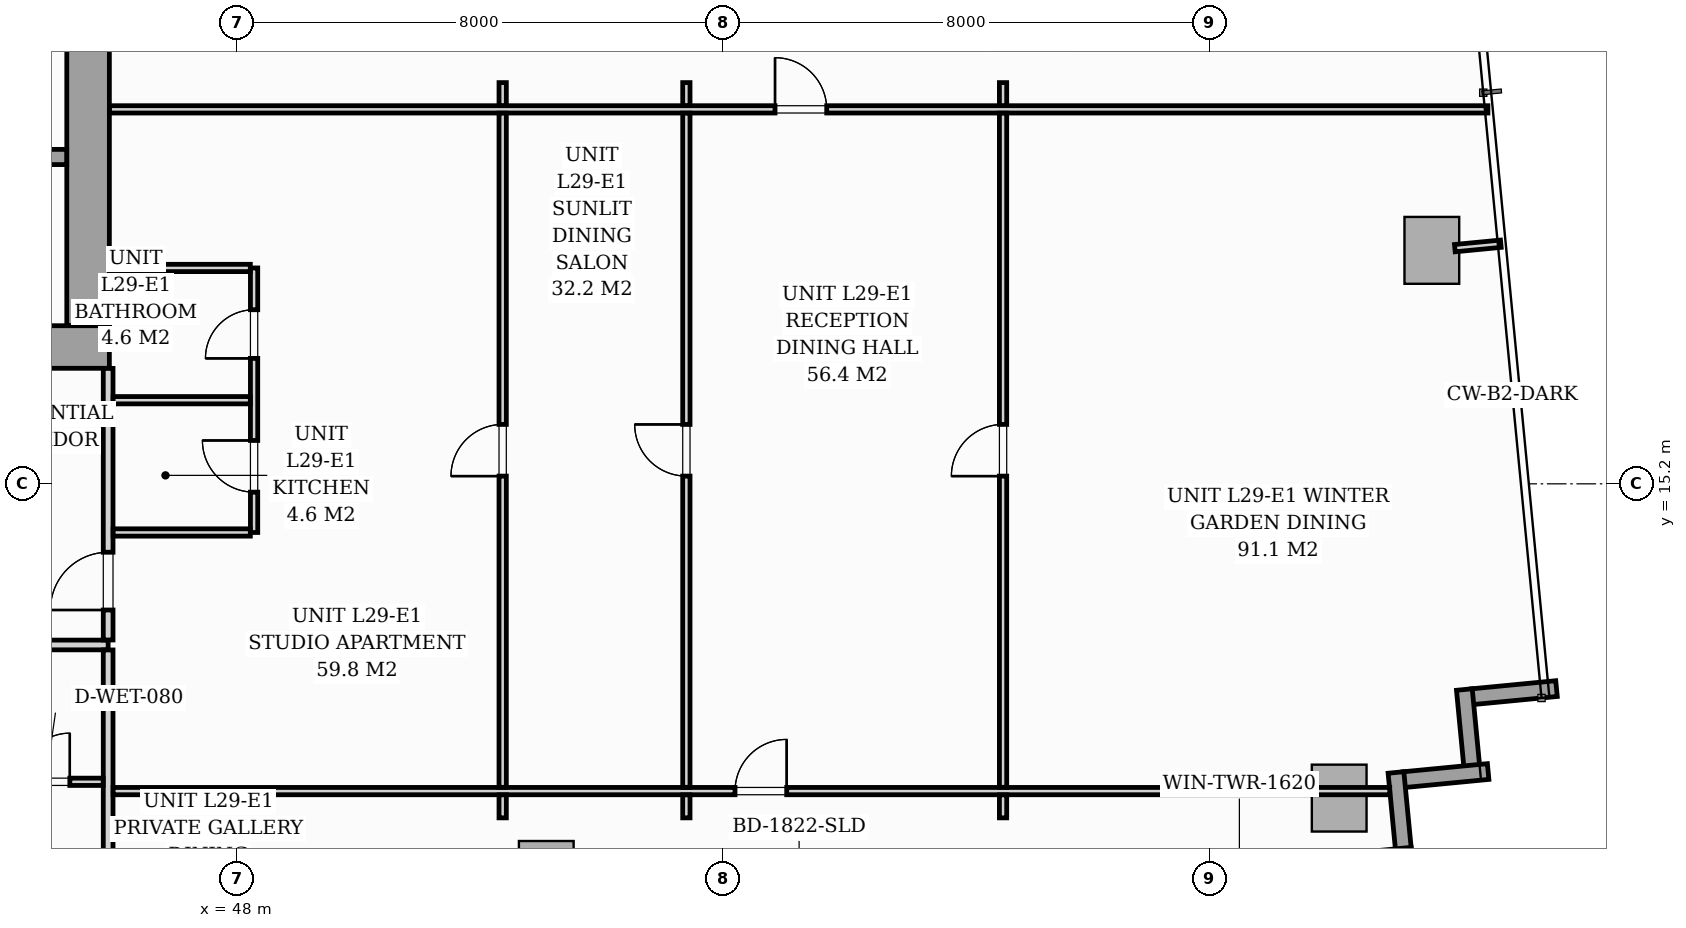
"""IFC4 building model, lengths in metres.
Left out: names, types, materials, properties, quantities, classifications, styles, units other than length and angle.
Written with IfcOpenShell. Run it as: python <this file> out.ifc"""

import sys

from ifc_helpers import new_model, si_unit, direction, frame, frame_2d, origin, origin_2d, place, context, subcontext, project, spatial, rectangle, i_section, extrude, source, transform, mapped, element, fill, save


model = new_model("IFC4")
c1 = context("Model", 3, precision=1e-05, world=origin(), true_north=direction((0.0, 1.0)))
c2 = subcontext(c1, "Body", "Model", "MODEL_VIEW")
j1 = project(units=[si_unit("LENGTHUNIT", "METRE"), si_unit("PLANEANGLEUNIT", "RADIAN")], contexts=[c1])
p1 = place(None, origin())
s1 = spatial("IfcSite", under=j1, at=p1, CompositionType="ELEMENT")
p2 = place(p1, origin())
s2 = spatial("IfcBuilding", under=s1, at=p2, CompositionType="ELEMENT")
p3 = place(p2, frame((0.0, 0.0, 103.4)))
s3 = spatial("IfcBuildingStorey", under=s2, at=p3, CompositionType="ELEMENT", Elevation=103.4)
m1 = source(origin(), c2, "Body", "SweptSolid", [
    extrude(i_section(OverallWidth=0.427, OverallDepth=0.483, WebThickness=0.051, FlangeThickness=0.082, FilletRadius=0.018, at=origin_2d()), origin(), (0.0, 0.0, 1.0), 3.196),
])
p4 = place(p3, frame((45.6, 17.4, 0.002), z_axis=(0.0, 0.0, 1.0), x_axis=(1.0, 0.0, 0.0)))
e1 = element("IfcColumn", 1, at=p4, inside=s3, PredefinedType="PILASTER", context=c2, shape_type="MappedRepresentation", body=[
    mapped(m1, transform((0.0, 0.0, 0.0), scale=1.0)),
])
m2 = source(origin(), c2, "Body", "SweptSolid", [
    extrude(rectangle(XDim=0.9, YDim=1.1, at=origin_2d()), origin(), (0.0, 0.0, 1.0), 3.196),
])
for number, where, z_axis, x_axis in (
    (2, (53.085, 8.776, 0.002), (0.0, 0.0, 1.0), (0.995, 0.096, 0.0)),
    (3, (66.125, 10.032, 0.002), (0.0, 0.0, 1.0), (0.995, 0.096, 0.0)),
    (4, (67.648, 19.039, 0.002), (0.0, 0.0, 1.0), (0.995, 0.096, 0.0)),
):
    element("IfcColumn", number, at=place(p3, frame(where, z_axis=z_axis, x_axis=x_axis)), inside=s3, PredefinedType="COLUMN", context=c2, shape_type="MappedRepresentation", body=[
        mapped(m2, transform((0.0, 0.0, 0.0), scale=1.0)),
    ])
for number, where, z_axis, x_axis in (
    (5, (69.698, 11.833, 0.0), (0.0, 0.0, 1.0), (-0.995, -0.096, 0.0)),
    (6, (68.183, 11.817, 0.0), (0.0, 0.0, 1.0), (0.096, -0.995, 0.0)),
):
    element("IfcWall", number, at=place(p3, frame(where, z_axis=z_axis, x_axis=x_axis)), inside=s3, PredefinedType="STANDARD", context=c2, shape_type="SweptSolid", body=[
        extrude(rectangle(XDim=1.395, YDim=0.26, at=frame_2d((0.697, 0.0))), origin(), (0.0, 0.0, 1.0), 2.94),
    ])
p5 = place(p3, frame((68.574, 10.469, 0.0), z_axis=(0.0, 0.0, 1.0), x_axis=(-0.99540774648, -0.095725744959, 0.0)))
e7 = element("IfcWall", 7, at=p5, inside=s3, PredefinedType="STANDARD", context=c2, shape_type="SweptSolid", body=[
    extrude(rectangle(XDim=1.395, YDim=0.26, at=frame_2d((0.698, 0.0))), origin(), (0.0, 0.0, 1.0), 2.94),
])
p6 = place(p3, frame((67.059, 10.453, 0.0), z_axis=(0.0, 0.0, 1.0), x_axis=(0.095915846097, -0.995389446633, 0.0)))
e8 = element("IfcWall", 8, at=p6, inside=s3, PredefinedType="STANDARD", context=c2, shape_type="SweptSolid", body=[
    extrude(rectangle(XDim=1.395, YDim=0.26, at=frame_2d((0.697, 0.0))), origin(), (0.0, 0.0, 1.0), 2.94),
])
p7 = place(p3, frame((67.32, 9.092, 0.0), z_axis=(0.0, 0.0, 1.0), x_axis=(-0.995396521236, -0.095842399342, 0.0)))
e9 = element("IfcWall", 9, at=p7, inside=s3, PredefinedType="STANDARD", context=c2, shape_type="SweptSolid", body=[
    extrude(rectangle(XDim=19.11, YDim=0.26, at=frame_2d((9.555, 0.0))), origin(), (0.0, 0.0, 1.0), 2.94),
])
p8 = place(p7, frame((9.224, 0.0, 0.0)))
e10 = element("IfcOpeningElement", 10, at=p8, cuts=e9, PredefinedType="OPENING", context=c2, shape_type="SweptSolid", body=[
    extrude(rectangle(XDim=1.8, YDim=2.06, at=frame_2d((0.9, 1.03))), frame((0.0, 0.14, 0.0), z_axis=(0.0, -1.0, 0.0), x_axis=(1.0, 0.0, 0.0)), (0.0, 0.0, 1.0), 0.28),
])
p9 = place(p7, frame((2.05, 0.0, 0.65)))
e11 = element("IfcOpeningElement", 11, at=p9, cuts=e9, PredefinedType="OPENING", context=c2, shape_type="SweptSolid", body=[
    extrude(rectangle(XDim=1.6, YDim=1.5, at=frame_2d((0.8, 0.75))), frame((0.0, 0.14, 0.0), z_axis=(0.0, -1.0, 0.0), x_axis=(1.0, 0.0, 0.0)), (0.0, 0.0, 1.0), 0.28),
])
p10 = place(p3, frame((26.1, 17.45, 0.0), z_axis=(0.0, 0.0, 1.0), x_axis=(1.0, 0.0, 0.0)))
e12 = element("IfcWall", 12, at=p10, inside=s3, PredefinedType="SHEAR", context=c2, shape_type="SweptSolid", body=[
    extrude(rectangle(XDim=19.8, YDim=0.7, at=frame_2d((9.9, 0.0))), origin(), (0.0, 0.0, 1.0), 3.2),
])
p11 = place(p10, frame((1.05, 0.0, 0.0)))
e13 = element("IfcOpeningElement", 13, at=p11, cuts=e12, PredefinedType="OPENING", context=c2, shape_type="SweptSolid", body=[
    extrude(rectangle(XDim=0.95, YDim=2.06, at=frame_2d((0.475, 1.03))), frame((0.0, 0.36, 0.0), z_axis=(0.0, -1.0, 0.0), x_axis=(1.0, 0.0, 0.0)), (0.0, 0.0, 1.0), 0.72),
])
p12 = place(p10, frame((9.48, 0.0, 0.0)))
e14 = element("IfcOpeningElement", 14, at=p12, cuts=e12, PredefinedType="OPENING", context=c2, shape_type="SweptSolid", body=[
    extrude(rectangle(XDim=0.85, YDim=2.0, at=frame_2d((0.425, 1.0))), frame((0.0, 0.36, 0.0), z_axis=(0.0, -1.0, 0.0), x_axis=(1.0, 0.0, 0.0)), (0.0, 0.0, 1.0), 0.72),
])
p13 = place(p10, frame((17.65, 0.0, 0.0)))
e15 = element("IfcOpeningElement", 15, at=p13, cuts=e12, PredefinedType="OPENING", context=c2, shape_type="SweptSolid", body=[
    extrude(rectangle(XDim=0.95, YDim=2.06, at=frame_2d((0.475, 1.03))), frame((0.0, 0.36, 0.0), z_axis=(0.0, -1.0, 0.0), x_axis=(1.0, 0.0, 0.0)), (0.0, 0.0, 1.0), 0.72),
])
p14 = place(p3, frame((45.55, 17.802, 0.0), z_axis=(0.0, 0.0, 1.0), x_axis=(0.0, 1.0, 0.0)))
e16 = element("IfcWall", 16, at=p14, inside=s3, PredefinedType="SHEAR", context=c2, shape_type="SweptSolid", body=[
    extrude(rectangle(XDim=5.796, YDim=0.7, at=frame_2d((2.898, 0.0))), origin(), (0.0, 0.0, 1.0), 3.2),
])
p15 = place(p3, frame((37.05, 20.575, 0.0), z_axis=(0.0, 0.0, 1.0), x_axis=(1.0, 0.0, 0.0)))
e17 = element("IfcWall", 17, at=p15, inside=s3, PredefinedType="SOLIDWALL", context=c2, shape_type="SweptSolid", body=[
    extrude(rectangle(XDim=8.148, YDim=0.25, at=frame_2d((4.074, 0.0))), origin(), (0.0, 0.0, 1.0), 3.2),
])
p16 = place(p15, frame((6.6, 0.0, 0.0)))
e18 = element("IfcOpeningElement", 18, at=p16, cuts=e17, PredefinedType="OPENING", context=c2, shape_type="SweptSolid", body=[
    extrude(rectangle(XDim=0.95, YDim=2.06, at=frame_2d((0.475, 1.03))), frame((0.0, 0.135, 0.0), z_axis=(0.0, -1.0, 0.0), x_axis=(1.0, 0.0, 0.0)), (0.0, 0.0, 1.0), 0.27),
])
p17 = place(p3, frame((21.5, 12.55, 0.0), z_axis=(0.0, 0.0, 1.0), x_axis=(1.0, 0.0, 0.0)))
e19 = element("IfcWall", 19, at=p17, inside=s3, PredefinedType="PARTITIONING", context=c2, shape_type="SweptSolid", body=[
    extrude(rectangle(XDim=24.38, YDim=0.16, at=frame_2d((12.19, 0.0))), origin(), (0.0, 0.0, 1.0), 2.94),
])
p18 = place(p17, frame((6.075, 0.0, 0.0)))
e20 = element("IfcOpeningElement", 20, at=p18, cuts=e19, PredefinedType="OPENING", context=c2, shape_type="SweptSolid", body=[
    extrude(rectangle(XDim=0.95, YDim=2.06, at=frame_2d((0.475, 1.03))), frame((0.0, 0.09, 0.0), z_axis=(0.0, -1.0, 0.0), x_axis=(1.0, 0.0, 0.0)), (0.0, 0.0, 1.0), 0.18),
])
p19 = place(p17, frame((10.519, 0.0, 0.0)))
e21 = element("IfcOpeningElement", 21, at=p19, cuts=e19, PredefinedType="OPENING", context=c2, shape_type="SweptSolid", body=[
    extrude(rectangle(XDim=0.95, YDim=2.06, at=frame_2d((0.475, 1.03))), frame((0.0, 0.09, 0.0), z_axis=(0.0, -1.0, 0.0), x_axis=(1.0, 0.0, 0.0)), (0.0, 0.0, 1.0), 0.18),
])
p20 = place(p17, frame((18.208, 0.0, 0.0)))
e22 = element("IfcOpeningElement", 22, at=p20, cuts=e19, PredefinedType="OPENING", context=c2, shape_type="SweptSolid", body=[
    extrude(rectangle(XDim=0.95, YDim=2.06, at=frame_2d((0.475, 1.03))), frame((0.0, 0.09, 0.0), z_axis=(0.0, -1.0, 0.0), x_axis=(1.0, 0.0, 0.0)), (0.0, 0.0, 1.0), 0.18),
])
p21 = place(p3, frame((45.88, 6.977, 0.0), z_axis=(0.0, 0.0, 1.0), x_axis=(0.0, 1.0, 0.0)))
e23 = element("IfcWall", 23, at=p21, inside=s3, PredefinedType="PARTITIONING", context=c2, shape_type="SweptSolid", body=[
    extrude(rectangle(XDim=5.491, YDim=0.16, at=frame_2d((2.745, 0.0))), origin(), (0.0, 0.0, 1.0), 2.94),
])
p22 = place(p3, frame((45.88, 12.632, 0.0), z_axis=(0.0, 0.0, 1.0), x_axis=(0.0, 1.0, 0.0)))
e24 = element("IfcWall", 24, at=p22, inside=s3, PredefinedType="PARTITIONING", context=c2, shape_type="SweptSolid", body=[
    extrude(rectangle(XDim=4.466, YDim=0.16, at=frame_2d((2.233, 0.0))), origin(), (0.0, 0.0, 1.0), 2.94),
])
p23 = place(p22, frame((0.493, 0.0, 0.0)))
e25 = element("IfcOpeningElement", 25, at=p23, cuts=e24, PredefinedType="OPENING", context=c2, shape_type="SweptSolid", body=[
    extrude(rectangle(XDim=0.95, YDim=2.06, at=frame_2d((0.475, 1.03))), frame((0.0, 0.09, 0.0), z_axis=(0.0, -1.0, 0.0), x_axis=(1.0, 0.0, 0.0)), (0.0, 0.0, 1.0), 0.18),
])
p24 = place(p3, frame((41.7, 10.3, 0.0), z_axis=(0.0, 0.0, 1.0), x_axis=(1.0, 0.0, 0.0)))
e26 = element("IfcWall", 26, at=p24, inside=s3, PredefinedType="PARTITIONING", context=c2, shape_type="SweptSolid", body=[
    extrude(rectangle(XDim=4.098, YDim=0.12, at=frame_2d((2.049, 0.0))), origin(), (0.0, 0.0, 1.0), 2.94),
])
p25 = place(p24, frame((0.675, 0.0, 0.0)))
e27 = element("IfcOpeningElement", 27, at=p25, cuts=e26, PredefinedType="OPENING", context=c2, shape_type="SweptSolid", body=[
    extrude(rectangle(XDim=0.85, YDim=2.05, at=frame_2d((0.425, 1.025))), frame((0.0, 0.07, 0.0), z_axis=(0.0, -1.0, 0.0), x_axis=(1.0, 0.0, 0.0)), (0.0, 0.0, 1.0), 0.14),
])
p26 = place(p24, frame((2.75, 0.0, 0.0)))
e28 = element("IfcOpeningElement", 28, at=p26, cuts=e26, PredefinedType="OPENING", context=c2, shape_type="SweptSolid", body=[
    extrude(rectangle(XDim=0.8, YDim=2.02, at=frame_2d((0.4, 1.01))), frame((0.0, 0.07, 0.0), z_axis=(0.0, -1.0, 0.0), x_axis=(1.0, 0.0, 0.0)), (0.0, 0.0, 1.0), 0.14),
])
p27 = place(p3, frame((48.28, 14.4, 0.0), z_axis=(0.0, 0.0, 1.0), x_axis=(0.0, 1.0, 0.0)))
e29 = element("IfcWall", 29, at=p27, inside=s3, PredefinedType="PARTITIONING", context=c2, shape_type="SweptSolid", body=[
    extrude(rectangle(XDim=4.35, YDim=0.12, at=frame_2d((2.175, 0.0))), origin(), (0.0, 0.0, 1.0), 2.94),
])
p28 = place(p27, frame((0.663, 0.0, 0.0)))
e30 = element("IfcOpeningElement", 30, at=p28, cuts=e29, PredefinedType="OPENING", context=c2, shape_type="SweptSolid", body=[
    extrude(rectangle(XDim=0.85, YDim=2.05, at=frame_2d((0.425, 1.025))), frame((0.0, 0.07, 0.0), z_axis=(0.0, -1.0, 0.0), x_axis=(1.0, 0.0, 0.0)), (0.0, 0.0, 1.0), 0.14),
])
p29 = place(p27, frame((2.863, 0.0, 0.0)))
e31 = element("IfcOpeningElement", 31, at=p29, cuts=e29, PredefinedType="OPENING", context=c2, shape_type="SweptSolid", body=[
    extrude(rectangle(XDim=0.8, YDim=2.02, at=frame_2d((0.4, 1.01))), frame((0.0, 0.07, 0.0), z_axis=(0.0, -1.0, 0.0), x_axis=(1.0, 0.0, 0.0)), (0.0, 0.0, 1.0), 0.14),
])
for number, where, z_axis, x_axis in (
    (32, (45.962, 16.575, 0.0), (0.0, 0.0, 1.0), (1.0, 0.0, 0.0)),
    (33, (45.962, 14.4, 0.0), (0.0, 0.0, 1.0), (1.0, 0.0, 0.0)),
):
    element("IfcWall", number, at=place(p3, frame(where, z_axis=z_axis, x_axis=x_axis)), inside=s3, PredefinedType="PARTITIONING", context=c2, shape_type="SweptSolid", body=[
        extrude(rectangle(XDim=2.256, YDim=0.12, at=frame_2d((1.128, 0.0))), origin(), (0.0, 0.0, 1.0), 2.94),
    ])
p30 = place(p3, frame((45.902, 18.75, 0.0), z_axis=(0.0, 0.0, 1.0), x_axis=(1.0, 0.0, 0.0)))
e34 = element("IfcWall", 34, at=p30, inside=s3, PredefinedType="PARTITIONING", context=c2, shape_type="SweptSolid", body=[
    extrude(rectangle(XDim=2.316, YDim=0.12, at=frame_2d((1.158, 0.0))), origin(), (0.0, 0.0, 1.0), 2.94),
])
p31 = place(p3, frame((45.902, 21.358, 0.0), z_axis=(0.0, 0.0, 1.0), x_axis=(1.0, 0.0, 0.0)))
e35 = element("IfcWall", 35, at=p31, inside=s3, PredefinedType="PARTITIONING", context=c2, shape_type="SweptSolid", body=[
    extrude(rectangle(XDim=22.668, YDim=0.12, at=frame_2d((11.334, 0.0))), origin(), (0.0, 0.0, 1.0), 2.94),
])
p32 = place(p31, frame((10.945, 0.0, 0.0)))
e36 = element("IfcOpeningElement", 36, at=p32, cuts=e35, PredefinedType="OPENING", context=c2, shape_type="SweptSolid", body=[
    extrude(rectangle(XDim=0.85, YDim=2.05, at=frame_2d((0.425, 1.025))), frame((0.0, 0.07, 0.0), z_axis=(0.0, -1.0, 0.0), x_axis=(1.0, 0.0, 0.0)), (0.0, 0.0, 1.0), 0.14),
])
p33 = place(p3, frame((45.962, 10.147, 0.0), z_axis=(0.0, 0.0, 1.0), x_axis=(1.0, 0.0, 0.0)))
e37 = element("IfcWall", 37, at=p33, inside=s3, PredefinedType="PARTITIONING", context=c2, shape_type="SweptSolid", body=[
    extrude(rectangle(XDim=20.994, YDim=0.12, at=frame_2d((10.497, 0.0))), origin(), (0.0, 0.0, 1.0), 2.31),
])
p34 = place(p33, frame((10.227, 0.0, 0.0)))
e38 = element("IfcOpeningElement", 38, at=p34, cuts=e37, PredefinedType="OPENING", context=c2, shape_type="SweptSolid", body=[
    extrude(rectangle(XDim=0.85, YDim=2.05, at=frame_2d((0.425, 1.025))), frame((0.0, 0.07, 0.0), z_axis=(0.0, -1.0, 0.0), x_axis=(1.0, 0.0, 0.0)), (0.0, 0.0, 1.0), 0.14),
])
p35 = place(p3, frame((60.597, 9.707, 0.0), z_axis=(0.0, 0.0, 1.0), x_axis=(0.0, 1.0, 0.0)))
e39 = element("IfcWall", 39, at=p35, inside=s3, PredefinedType="PARTITIONING", context=c2, shape_type="SweptSolid", body=[
    extrude(rectangle(XDim=0.378, YDim=0.12, at=frame_2d((0.189, 0.0))), origin(), (0.0, 0.0, 1.0), 2.94),
])
p36 = place(p3, frame((60.597, 10.209, 0.0), z_axis=(0.0, 0.0, 1.0), x_axis=(0.0, 1.0, 0.0)))
e40 = element("IfcWall", 40, at=p36, inside=s3, PredefinedType="PARTITIONING", context=c2, shape_type="SweptSolid", body=[
    extrude(rectangle(XDim=11.087, YDim=0.12, at=frame_2d((5.543, 0.0))), origin(), (0.0, 0.0, 1.0), 2.94),
])
p37 = place(p36, frame((5.118, 0.0, 0.0)))
e41 = element("IfcOpeningElement", 41, at=p37, cuts=e40, PredefinedType="OPENING", context=c2, shape_type="SweptSolid", body=[
    extrude(rectangle(XDim=0.85, YDim=2.05, at=frame_2d((0.425, 1.025))), frame((0.0, 0.07, 0.0), z_axis=(0.0, -1.0, 0.0), x_axis=(1.0, 0.0, 0.0)), (0.0, 0.0, 1.0), 0.14),
])
p38 = place(p3, frame((60.597, 21.42, 0.0), z_axis=(0.0, 0.0, 1.0), x_axis=(0.0, 1.0, 0.0)))
e42 = element("IfcWall", 42, at=p38, inside=s3, PredefinedType="PARTITIONING", context=c2, shape_type="SweptSolid", body=[
    extrude(rectangle(XDim=0.378, YDim=0.12, at=frame_2d((0.189, 0.0))), origin(), (0.0, 0.0, 1.0), 2.94),
])
p39 = place(p3, frame((55.389, 9.707, 0.0), z_axis=(0.0, 0.0, 1.0), x_axis=(0.0, 1.0, 0.0)))
e43 = element("IfcWall", 43, at=p39, inside=s3, PredefinedType="PARTITIONING", context=c2, shape_type="SweptSolid", body=[
    extrude(rectangle(XDim=0.378, YDim=0.12, at=frame_2d((0.189, 0.0))), origin(), (0.0, 0.0, 1.0), 2.94),
])
p40 = place(p3, frame((55.389, 10.209, 0.0), z_axis=(0.0, 0.0, 1.0), x_axis=(0.0, 1.0, 0.0)))
e44 = element("IfcWall", 44, at=p40, inside=s3, PredefinedType="PARTITIONING", context=c2, shape_type="SweptSolid", body=[
    extrude(rectangle(XDim=11.087, YDim=0.12, at=frame_2d((5.543, 0.0))), origin(), (0.0, 0.0, 1.0), 2.94),
])
p41 = place(p40, frame((5.118, 0.0, 0.0)))
e45 = element("IfcOpeningElement", 45, at=p41, cuts=e44, PredefinedType="OPENING", context=c2, shape_type="SweptSolid", body=[
    extrude(rectangle(XDim=0.85, YDim=2.05, at=frame_2d((0.425, 1.025))), frame((0.0, 0.07, 0.0), z_axis=(0.0, -1.0, 0.0), x_axis=(1.0, 0.0, 0.0)), (0.0, 0.0, 1.0), 0.14),
])
p42 = place(p3, frame((55.389, 21.42, 0.0), z_axis=(0.0, 0.0, 1.0), x_axis=(0.0, 1.0, 0.0)))
e46 = element("IfcWall", 46, at=p42, inside=s3, PredefinedType="PARTITIONING", context=c2, shape_type="SweptSolid", body=[
    extrude(rectangle(XDim=0.378, YDim=0.12, at=frame_2d((0.189, 0.0))), origin(), (0.0, 0.0, 1.0), 2.94),
])
p43 = place(p3, frame((52.368, 9.707, 0.0), z_axis=(0.0, 0.0, 1.0), x_axis=(0.0, 1.0, 0.0)))
e47 = element("IfcWall", 47, at=p43, inside=s3, PredefinedType="PARTITIONING", context=c2, shape_type="SweptSolid", body=[
    extrude(rectangle(XDim=0.378, YDim=0.12, at=frame_2d((0.189, 0.0))), origin(), (0.0, 0.0, 1.0), 2.94),
])
p44 = place(p3, frame((52.368, 10.209, 0.0), z_axis=(0.0, 0.0, 1.0), x_axis=(0.0, 1.0, 0.0)))
e48 = element("IfcWall", 48, at=p44, inside=s3, PredefinedType="PARTITIONING", context=c2, shape_type="SweptSolid", body=[
    extrude(rectangle(XDim=11.087, YDim=0.12, at=frame_2d((5.543, 0.0))), origin(), (0.0, 0.0, 1.0), 2.94),
])
p45 = place(p44, frame((5.118, 0.0, 0.0)))
e49 = element("IfcOpeningElement", 49, at=p45, cuts=e48, PredefinedType="OPENING", context=c2, shape_type="SweptSolid", body=[
    extrude(rectangle(XDim=0.85, YDim=2.05, at=frame_2d((0.425, 1.025))), frame((0.0, 0.07, 0.0), z_axis=(0.0, -1.0, 0.0), x_axis=(1.0, 0.0, 0.0)), (0.0, 0.0, 1.0), 0.14),
])
p46 = place(p3, frame((52.368, 21.42, 0.0), z_axis=(0.0, 0.0, 1.0), x_axis=(0.0, 1.0, 0.0)))
e50 = element("IfcWall", 50, at=p46, inside=s3, PredefinedType="PARTITIONING", context=c2, shape_type="SweptSolid", body=[
    extrude(rectangle(XDim=0.378, YDim=0.12, at=frame_2d((0.189, 0.0))), origin(), (0.0, 0.0, 1.0), 2.94),
])
p47 = place(p3, frame((68.027, 19.076, 0.0), z_axis=(0.0, 0.0, 1.0), x_axis=(0.995377786728, 0.096036772582, 0.0)))
e51 = element("IfcWall", 51, at=p47, inside=s3, PredefinedType="PARTITIONING", context=c2, shape_type="SweptSolid", body=[
    extrude(rectangle(XDim=0.76, YDim=0.12, at=frame_2d((0.38, 0.0))), origin(), (0.0, 0.0, 1.0), 2.94),
])
m3 = source(origin(), c2, "Body", "SweptSolid", [
    extrude(rectangle(XDim=0.8, YDim=2.02, at=frame_2d((0.4, 1.01))), frame((0.0, 0.025, 0.0), z_axis=(0.0, -1.0, 0.0), x_axis=(1.0, 0.0, 0.0)), (0.0, 0.0, 1.0), 0.05),
])
p48 = place(p26, origin())
e52 = element("IfcDoor", 52, at=p48, inside=s3, OperationType="SINGLE_SWING_RIGHT", PredefinedType="DOOR", context=c2, shape_type="MappedRepresentation", body=[
    mapped(m3, transform((0.0, 0.0, 0.0), scale=1.0)),
])
fill(e28, e52)
m4 = source(origin(), c2, "Body", "SweptSolid", [
    extrude(rectangle(XDim=0.95, YDim=2.06, at=frame_2d((0.475, 1.03))), frame((0.0, 0.025, 0.0), z_axis=(0.0, -1.0, 0.0), x_axis=(1.0, 0.0, 0.0)), (0.0, 0.0, 1.0), 0.05),
])
p49 = place(p23, origin())
e53 = element("IfcDoor", 53, at=p49, inside=s3, OperationType="SINGLE_SWING_LEFT", PredefinedType="DOOR", context=c2, shape_type="MappedRepresentation", body=[
    mapped(m4, transform((0.0, 0.0, 0.0), scale=1.0)),
])
fill(e25, e53)
m5 = source(origin(), c2, "Body", "SweptSolid", [
    extrude(rectangle(XDim=0.85, YDim=2.05, at=frame_2d((0.425, 1.025))), frame((0.0, 0.025, 0.0), z_axis=(0.0, -1.0, 0.0), x_axis=(1.0, 0.0, 0.0)), (0.0, 0.0, 1.0), 0.05),
])
p50 = place(p28, origin())
e54 = element("IfcDoor", 54, at=p50, inside=s3, OperationType="SINGLE_SWING_RIGHT", PredefinedType="DOOR", context=c2, shape_type="MappedRepresentation", body=[
    mapped(m5, transform((0.0, 0.0, 0.0), scale=1.0)),
])
fill(e30, e54)
p51 = place(p29, origin())
e55 = element("IfcDoor", 55, at=p51, inside=s3, OperationType="SINGLE_SWING_LEFT", PredefinedType="DOOR", context=c2, shape_type="MappedRepresentation", body=[
    mapped(m3, transform((0.0, 0.0, 0.0), scale=1.0)),
])
fill(e31, e55)
p52 = place(p32, origin())
e56 = element("IfcDoor", 56, at=p52, inside=s3, OperationType="SINGLE_SWING_LEFT", PredefinedType="DOOR", context=c2, shape_type="MappedRepresentation", body=[
    mapped(m5, transform((0.0, 0.0, 0.0), scale=1.0)),
])
fill(e36, e56)
p53 = place(p34, origin())
e57 = element("IfcDoor", 57, at=p53, inside=s3, OperationType="SINGLE_SWING_RIGHT", PredefinedType="DOOR", context=c2, shape_type="MappedRepresentation", body=[
    mapped(m5, transform((0.0, 0.0, 0.0), scale=1.0)),
])
fill(e38, e57)
p54 = place(p37, origin())
e58 = element("IfcDoor", 58, at=p54, inside=s3, OperationType="SINGLE_SWING_LEFT", PredefinedType="DOOR", context=c2, shape_type="MappedRepresentation", body=[
    mapped(m5, transform((0.0, 0.0, 0.0), scale=1.0)),
])
fill(e41, e58)
p55 = place(p41, origin())
e59 = element("IfcDoor", 59, at=p55, inside=s3, OperationType="SINGLE_SWING_RIGHT", PredefinedType="DOOR", context=c2, shape_type="MappedRepresentation", body=[
    mapped(m5, transform((0.0, 0.0, 0.0), scale=1.0)),
])
fill(e45, e59)
p56 = place(p45, origin())
e60 = element("IfcDoor", 60, at=p56, inside=s3, OperationType="SINGLE_SWING_LEFT", PredefinedType="DOOR", context=c2, shape_type="MappedRepresentation", body=[
    mapped(m5, transform((0.0, 0.0, 0.0), scale=1.0)),
])
fill(e49, e60)
save(model, sys.argv[1])
